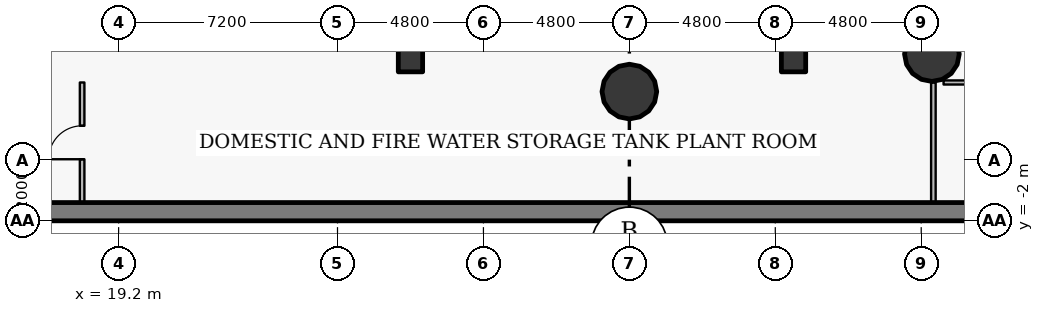
"""IFC4 building model, lengths in metres.
Left out: names, types, materials, properties, quantities, classifications, styles, units other than length and angle.
Written with IfcOpenShell. Run it as: python <this file> out.ifc"""

import sys

from ifc_helpers import new_model, si_unit, direction, frame, frame_2d, origin, origin_2d, place, context, subcontext, project, spatial, rectangle, hollow_circle, extrude, source, transform, mapped, element, fill, save


model = new_model("IFC4")
c1 = context("Model", 3, precision=1e-05, world=origin(), true_north=direction((0.0, 1.0)))
c2 = subcontext(c1, "Body", "Model", "MODEL_VIEW")
j1 = project(units=[si_unit("LENGTHUNIT", "METRE"), si_unit("PLANEANGLEUNIT", "RADIAN")], contexts=[c1])
p1 = place(None, origin())
s1 = spatial("IfcSite", under=j1, at=p1, CompositionType="ELEMENT")
p2 = place(p1, origin())
s2 = spatial("IfcBuilding", under=s1, at=p2, CompositionType="ELEMENT")
p3 = place(p2, frame((0.0, 0.0, -9.0)))
s3 = spatial("IfcBuildingStorey", under=s2, at=p3, CompositionType="ELEMENT", Elevation=-9.0)
p4 = place(p3, frame((41.4, 3.3, 0.0), z_axis=(0.0, 0.0, 1.0), x_axis=(1.0, 0.0, 0.0)))
e1 = element("IfcColumn", 1, at=p4, inside=s3, PredefinedType="COLUMN", context=c2, shape_type="SweptSolid", body=[
    extrude(rectangle(XDim=0.8, YDim=0.8, at=origin_2d()), origin(), (0.0, 0.0, 1.0), 1.525),
])
p5 = place(p3, frame((28.8, 3.3, 0.0), z_axis=(0.0, 0.0, 1.0), x_axis=(1.0, 0.0, 0.0)))
e2 = element("IfcColumn", 2, at=p5, inside=s3, PredefinedType="COLUMN", context=c2, shape_type="SweptSolid", body=[
    extrude(rectangle(XDim=0.8, YDim=0.8, at=origin_2d()), origin(), (0.0, 0.0, 1.0), 3.1),
])
p6 = place(p3, frame((78.0, -1.7, 0.0), z_axis=(0.0, 0.0, 1.0), x_axis=(-1.0, 0.0, 0.0)))
e3 = element("IfcWall", 3, at=p6, inside=s3, PredefinedType="SHEAR", context=c2, shape_type="SweptSolid", body=[
    extrude(rectangle(XDim=84.0, YDim=0.6, at=frame_2d((42.0, 0.0))), origin(), (0.0, 0.0, 1.0), 4.2),
])
for number, where, z_axis, x_axis in (
    (4, (36.0, 2.25, 0.0), (0.0, 0.0, 1.0), (1.0, 0.0, 0.0)),
    (5, (45.951, 3.484, 0.0), (0.0, 0.0, 1.0), (1.0, 0.0, 0.0)),
):
    element("IfcColumn", number, at=place(p3, frame(where, z_axis=z_axis, x_axis=x_axis)), inside=s3, PredefinedType="COLUMN", context=c2, shape_type="SweptSolid", body=[
        extrude(hollow_circle(Radius=0.9, WallThickness=0.05, at=origin_2d()), origin(), (0.0, 0.0, 1.0), 4.5),
    ])
p7 = place(p3, frame((18.0, -1.4, 0.0), z_axis=(0.0, 0.0, 1.0), x_axis=(0.0, 1.0, 0.0)))
e6 = element("IfcWall", 6, at=p7, inside=s3, PredefinedType="PARTITIONING", context=c2, shape_type="SweptSolid", body=[
    extrude(rectangle(XDim=3.95, YDim=0.15, at=frame_2d((1.975, 0.0))), origin(), (0.0, 0.0, 1.0), 3.385),
])
p8 = place(p7, frame((1.425, 0.0, 0.0)))
e7 = element("IfcOpeningElement", 7, at=p8, cuts=e6, PredefinedType="OPENING", context=c2, shape_type="SweptSolid", body=[
    extrude(rectangle(XDim=1.1, YDim=2.15, at=origin_2d()), frame((0.55, 0.085, 1.075), z_axis=(0.0, -1.0, 0.0), x_axis=(1.0, 0.0, 0.0)), (0.0, 0.0, 1.0), 0.17),
])
p9 = place(p3, frame((46.0, -1.4, 0.0), z_axis=(0.0, 0.0, 1.0), x_axis=(0.0, 1.0, 0.0)))
e8 = element("IfcWall", 8, at=p9, inside=s3, PredefinedType="PARTITIONING", context=c2, shape_type="SweptSolid", body=[
    extrude(rectangle(XDim=3.95, YDim=0.15, at=frame_2d((1.975, 0.0))), origin(), (0.0, 0.0, 1.0), 4.2),
])
p10 = place(p3, frame((46.335, 2.55, 0.0), z_axis=(0.0, 0.0, 1.0), x_axis=(1.0, 0.0, 0.0)))
e9 = element("IfcWall", 9, at=p10, inside=s3, PredefinedType="PARTITIONING", context=c2, shape_type="SweptSolid", body=[
    extrude(rectangle(XDim=7.665, YDim=0.135, at=frame_2d((3.833, 0.0))), origin(), (0.0, 0.0, 1.0), 3.385),
])
m1 = source(origin(), c2, "Body", "SweptSolid", [
    extrude(rectangle(XDim=1.1, YDim=2.15, at=origin_2d()), frame((0.55, 0.025, 1.075), z_axis=(0.0, -1.0, 0.0), x_axis=(1.0, 0.0, 0.0)), (0.0, 0.0, 1.0), 0.05),
])
p11 = place(p8, origin())
e10 = element("IfcDoor", 10, at=p11, inside=s3, OperationType="SINGLE_SWING_LEFT", PredefinedType="DOOR", context=c2, shape_type="MappedRepresentation", body=[
    mapped(m1, transform((0.0, 0.0, 0.0), x_axis=(1.0, 0.0, 0.0), y_axis=(0.0, 1.0, 0.0), z_axis=(0.0, 0.0, 1.0), scale=1.0)),
])
fill(e7, e10)
save(model, sys.argv[1])
